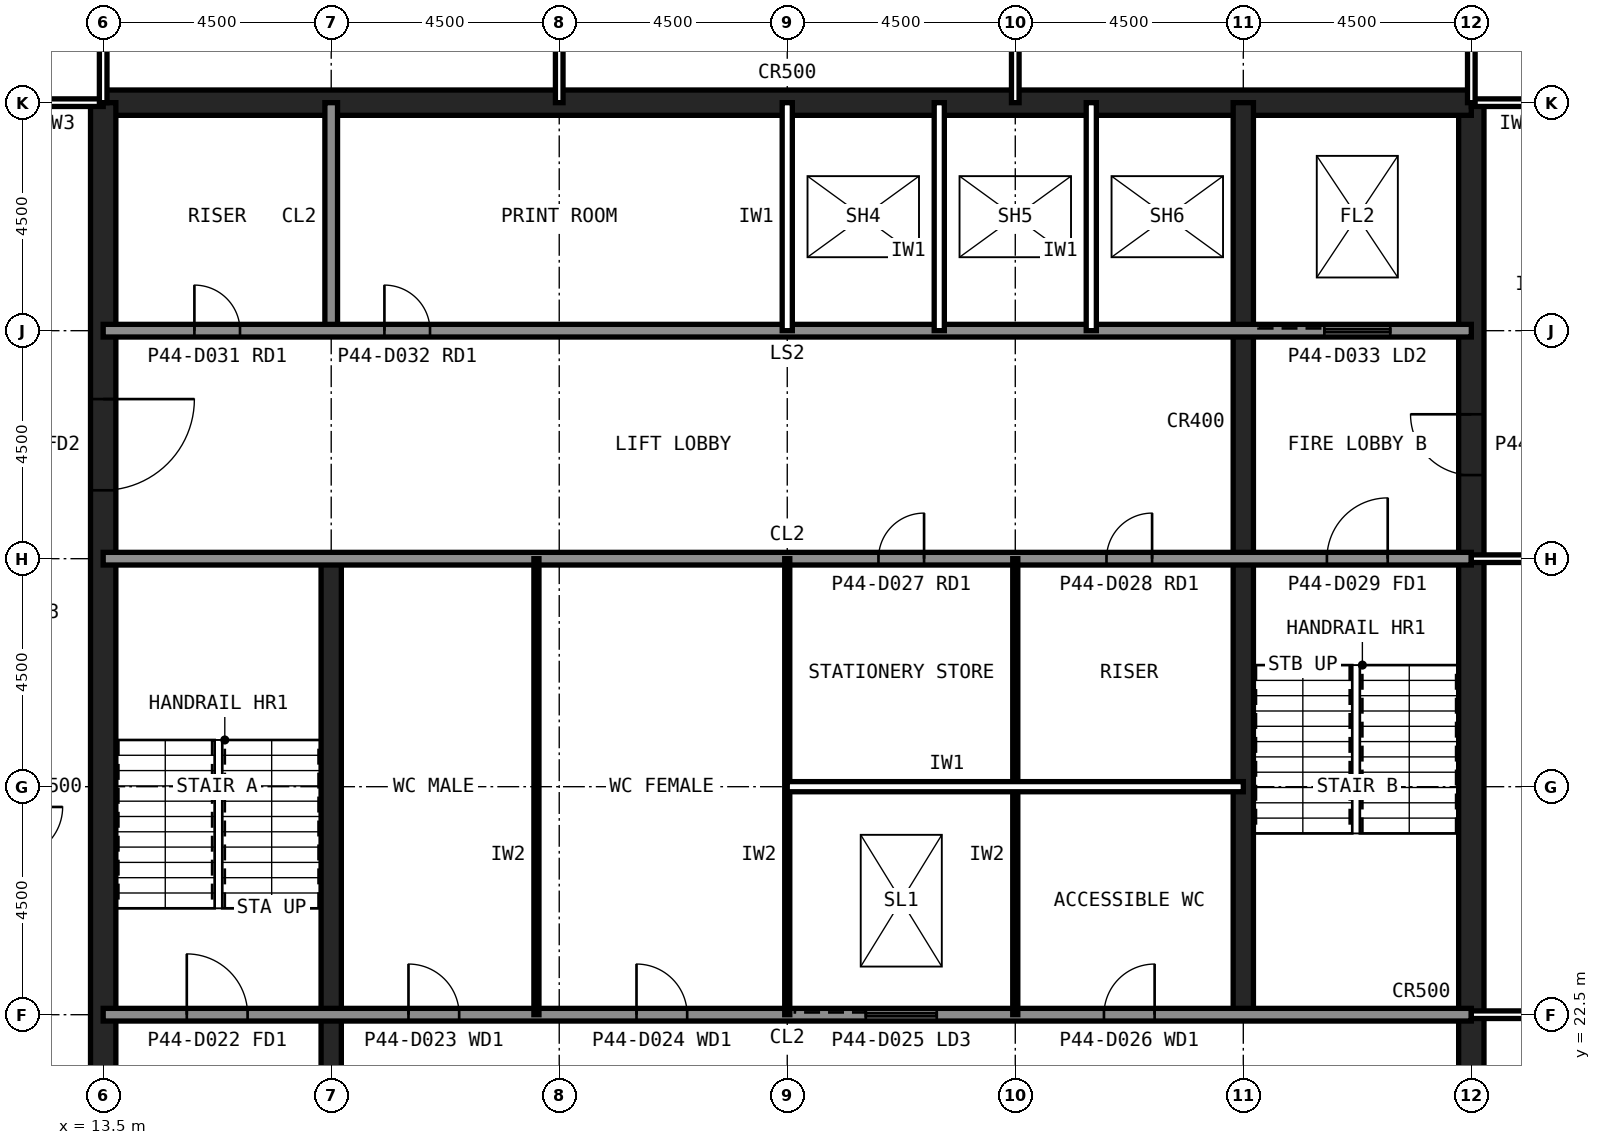
"""IFC4 building model, lengths in metres.
Left out: names, types, materials, properties, quantities, classifications, styles, units other than length and angle.
Written with IfcOpenShell. Run it as: python <this file> out.ifc"""

import sys

from ifc_helpers import new_model, si_unit, direction, frame, frame_2d, origin, place, context, subcontext, project, spatial, rectangle, extrude, element, fill, save


model = new_model("IFC4")
c1 = context("Model", 3, precision=1e-05, world=origin(), true_north=direction((0.0, 1.0)))
c2 = subcontext(c1, "Body", "Model", "MODEL_VIEW")
j1 = project(units=[si_unit("LENGTHUNIT", "METRE"), si_unit("PLANEANGLEUNIT", "RADIAN")], contexts=[c1])
p1 = place(None, origin())
s1 = spatial("IfcSite", under=j1, at=p1, CompositionType="ELEMENT")
p2 = place(p1, origin())
s2 = spatial("IfcBuilding", under=s1, at=p2, CompositionType="ELEMENT")
p3 = place(p2, frame((0.0, 0.0, 183.6)))
s3 = spatial("IfcBuildingStorey", under=s2, at=p3, CompositionType="ELEMENT", Elevation=183.6)
p4 = place(p3, frame((40.5, 13.5, 0.0), z_axis=(0.0, 0.0, 1.0), x_axis=(0.0, 1.0, 0.0)))
e1 = element("IfcWall", 1, at=p4, inside=s3, PredefinedType="SHEAR", context=c2, shape_type="SweptSolid", body=[
    extrude(rectangle(XDim=27.0, YDim=0.5, at=frame_2d((13.5, 0.0))), origin(), (0.0, 0.0, 1.0), 4.0),
])
p5 = place(p4, frame((5.85, 0.0, 0.0)))
e2 = element("IfcOpeningElement", 2, at=p5, cuts=e1, PredefinedType="OPENING", context=c2, shape_type="SweptSolid", body=[
    extrude(rectangle(XDim=1.8, YDim=2.1, at=frame_2d((0.9, 1.05))), frame((0.0, 0.26, 0.0), z_axis=(0.0, -1.0, 0.0), x_axis=(1.0, 0.0, 0.0)), (0.0, 0.0, 1.0), 0.52),
])
p6 = place(p4, frame((19.65, 0.0, 0.0)))
e3 = element("IfcOpeningElement", 3, at=p6, cuts=e1, PredefinedType="OPENING", context=c2, shape_type="SweptSolid", body=[
    extrude(rectangle(XDim=1.2, YDim=2.1, at=frame_2d((0.6, 1.05))), frame((0.0, 0.26, 0.0), z_axis=(0.0, -1.0, 0.0), x_axis=(1.0, 0.0, 0.0)), (0.0, 0.0, 1.0), 0.52),
])
p7 = place(p3, frame((40.5, 40.5, 0.0), z_axis=(0.0, 0.0, 1.0), x_axis=(-1.0, 0.0, 0.0)))
e4 = element("IfcWall", 4, at=p7, inside=s3, PredefinedType="SHEAR", context=c2, shape_type="SweptSolid", body=[
    extrude(rectangle(XDim=27.0, YDim=0.5, at=frame_2d((13.5, 0.0))), origin(), (0.0, 0.0, 1.0), 4.0),
])
p8 = place(p3, frame((13.5, 40.5, 0.0), z_axis=(0.0, 0.0, 1.0), x_axis=(0.0, -1.0, 0.0)))
e5 = element("IfcWall", 5, at=p8, inside=s3, PredefinedType="SHEAR", context=c2, shape_type="SweptSolid", body=[
    extrude(rectangle(XDim=27.0, YDim=0.5, at=frame_2d((13.5, 0.0))), origin(), (0.0, 0.0, 1.0), 4.0),
])
p9 = place(p8, frame((19.65, 0.0, 0.0)))
e6 = element("IfcOpeningElement", 6, at=p9, cuts=e5, PredefinedType="OPENING", context=c2, shape_type="SweptSolid", body=[
    extrude(rectangle(XDim=1.2, YDim=2.1, at=frame_2d((0.6, 1.05))), frame((0.0, 0.26, 0.0), z_axis=(0.0, -1.0, 0.0), x_axis=(1.0, 0.0, 0.0)), (0.0, 0.0, 1.0), 0.52),
])
p10 = place(p8, frame((5.85, 0.0, 0.0)))
e7 = element("IfcOpeningElement", 7, at=p10, cuts=e5, PredefinedType="OPENING", context=c2, shape_type="SweptSolid", body=[
    extrude(rectangle(XDim=1.8, YDim=2.1, at=frame_2d((0.9, 1.05))), frame((0.0, 0.26, 0.0), z_axis=(0.0, -1.0, 0.0), x_axis=(1.0, 0.0, 0.0)), (0.0, 0.0, 1.0), 0.52),
])
p11 = place(p3, frame((18.0, 13.5, 0.0), z_axis=(0.0, 0.0, 1.0), x_axis=(0.0, 1.0, 0.0)))
e8 = element("IfcWall", 8, at=p11, inside=s3, PredefinedType="SHEAR", context=c2, shape_type="SweptSolid", body=[
    extrude(rectangle(XDim=18.0, YDim=0.4, at=frame_2d((9.0, 0.0))), origin(), (0.0, 0.0, 1.0), 4.0),
])
p12 = place(p3, frame((18.0, 36.0, 0.0), z_axis=(0.0, 0.0, 1.0), x_axis=(0.0, 1.0, 0.0)))
e9 = element("IfcWall", 9, at=p12, inside=s3, PredefinedType="SOLIDWALL", context=c2, shape_type="SweptSolid", body=[
    extrude(rectangle(XDim=4.5, YDim=0.25, at=frame_2d((2.25, 0.0))), origin(), (0.0, 0.0, 1.0), 3.84),
])
p13 = place(p3, frame((36.0, 22.5, 0.0), z_axis=(0.0, 0.0, 1.0), x_axis=(0.0, 1.0, 0.0)))
e10 = element("IfcWall", 10, at=p13, inside=s3, PredefinedType="SHEAR", context=c2, shape_type="SweptSolid", body=[
    extrude(rectangle(XDim=18.0, YDim=0.4, at=frame_2d((9.0, 0.0))), origin(), (0.0, 0.0, 1.0), 4.0),
])
p14 = place(p3, frame((13.5, 36.0, 0.0), z_axis=(0.0, 0.0, 1.0), x_axis=(1.0, 0.0, 0.0)))
e11 = element("IfcWall", 11, at=p14, inside=s3, PredefinedType="SOLIDWALL", context=c2, shape_type="SweptSolid", body=[
    extrude(rectangle(XDim=27.0, YDim=0.25, at=frame_2d((13.5, 0.0))), origin(), (0.0, 0.0, 1.0), 3.84),
])
p15 = place(p14, frame((1.8, 0.0, 0.0)))
e12 = element("IfcOpeningElement", 12, at=p15, cuts=e11, PredefinedType="OPENING", context=c2, shape_type="SweptSolid", body=[
    extrude(rectangle(XDim=0.9, YDim=2.1, at=frame_2d((0.45, 1.05))), frame((0.0, 0.135, 0.0), z_axis=(0.0, -1.0, 0.0), x_axis=(1.0, 0.0, 0.0)), (0.0, 0.0, 1.0), 0.27),
])
p16 = place(p14, frame((5.55, 0.0, 0.0)))
e13 = element("IfcOpeningElement", 13, at=p16, cuts=e11, PredefinedType="OPENING", context=c2, shape_type="SweptSolid", body=[
    extrude(rectangle(XDim=0.9, YDim=2.1, at=frame_2d((0.45, 1.05))), frame((0.0, 0.135, 0.0), z_axis=(0.0, -1.0, 0.0), x_axis=(1.0, 0.0, 0.0)), (0.0, 0.0, 1.0), 0.27),
])
p17 = place(p14, frame((8.55, 0.0, 0.0)))
e14 = element("IfcOpeningElement", 14, at=p17, cuts=e11, PredefinedType="OPENING", context=c2, shape_type="SweptSolid", body=[
    extrude(rectangle(XDim=0.9, YDim=2.1, at=frame_2d((0.45, 1.05))), frame((0.0, 0.135, 0.0), z_axis=(0.0, -1.0, 0.0), x_axis=(1.0, 0.0, 0.0)), (0.0, 0.0, 1.0), 0.27),
])
p18 = place(p14, frame((24.1, 0.0, 0.0)))
e15 = element("IfcOpeningElement", 15, at=p18, cuts=e11, PredefinedType="OPENING", context=c2, shape_type="SweptSolid", body=[
    extrude(rectangle(XDim=1.3, YDim=2.2, at=frame_2d((0.65, 1.1))), frame((0.0, 0.135, 0.0), z_axis=(0.0, -1.0, 0.0), x_axis=(1.0, 0.0, 0.0)), (0.0, 0.0, 1.0), 0.27),
])
p19 = place(p3, frame((13.5, 22.5, 0.0), z_axis=(0.0, 0.0, 1.0), x_axis=(1.0, 0.0, 0.0)))
e16 = element("IfcWall", 16, at=p19, inside=s3, PredefinedType="SOLIDWALL", context=c2, shape_type="SweptSolid", body=[
    extrude(rectangle(XDim=27.0, YDim=0.25, at=frame_2d((13.5, 0.0))), origin(), (0.0, 0.0, 1.0), 3.84),
])
p20 = place(p19, frame((1.65, 0.0, 0.0)))
e17 = element("IfcOpeningElement", 17, at=p20, cuts=e16, PredefinedType="OPENING", context=c2, shape_type="SweptSolid", body=[
    extrude(rectangle(XDim=1.2, YDim=2.1, at=frame_2d((0.6, 1.05))), frame((0.0, 0.135, 0.0), z_axis=(0.0, -1.0, 0.0), x_axis=(1.0, 0.0, 0.0)), (0.0, 0.0, 1.0), 0.27),
])
p21 = place(p19, frame((6.025, 0.0, 0.0)))
e18 = element("IfcOpeningElement", 18, at=p21, cuts=e16, PredefinedType="OPENING", context=c2, shape_type="SweptSolid", body=[
    extrude(rectangle(XDim=1.0, YDim=2.1, at=frame_2d((0.5, 1.05))), frame((0.0, 0.135, 0.0), z_axis=(0.0, -1.0, 0.0), x_axis=(1.0, 0.0, 0.0)), (0.0, 0.0, 1.0), 0.27),
])
p22 = place(p19, frame((10.525, 0.0, 0.0)))
e19 = element("IfcOpeningElement", 19, at=p22, cuts=e16, PredefinedType="OPENING", context=c2, shape_type="SweptSolid", body=[
    extrude(rectangle(XDim=1.0, YDim=2.1, at=frame_2d((0.5, 1.05))), frame((0.0, 0.135, 0.0), z_axis=(0.0, -1.0, 0.0), x_axis=(1.0, 0.0, 0.0)), (0.0, 0.0, 1.0), 0.27),
])
p23 = place(p19, frame((19.75, 0.0, 0.0)))
e20 = element("IfcOpeningElement", 20, at=p23, cuts=e16, PredefinedType="OPENING", context=c2, shape_type="SweptSolid", body=[
    extrude(rectangle(XDim=1.0, YDim=2.1, at=frame_2d((0.5, 1.05))), frame((0.0, 0.135, 0.0), z_axis=(0.0, -1.0, 0.0), x_axis=(1.0, 0.0, 0.0)), (0.0, 0.0, 1.0), 0.27),
])
p24 = place(p19, frame((15.05, 0.0, 0.0)))
e21 = element("IfcOpeningElement", 21, at=p24, cuts=e16, PredefinedType="OPENING", context=c2, shape_type="SweptSolid", body=[
    extrude(rectangle(XDim=1.4, YDim=2.4, at=frame_2d((0.7, 1.2))), frame((0.0, 0.135, 0.0), z_axis=(0.0, -1.0, 0.0), x_axis=(1.0, 0.0, 0.0)), (0.0, 0.0, 1.0), 0.27),
])
p25 = place(p3, frame((13.5, 31.5, 0.0), z_axis=(0.0, 0.0, 1.0), x_axis=(1.0, 0.0, 0.0)))
e22 = element("IfcWall", 22, at=p25, inside=s3, PredefinedType="SOLIDWALL", context=c2, shape_type="SweptSolid", body=[
    extrude(rectangle(XDim=27.0, YDim=0.25, at=frame_2d((13.5, 0.0))), origin(), (0.0, 0.0, 1.0), 3.84),
])
p26 = place(p25, frame((24.15, 0.0, 0.0)))
e23 = element("IfcOpeningElement", 23, at=p26, cuts=e22, PredefinedType="OPENING", context=c2, shape_type="SweptSolid", body=[
    extrude(rectangle(XDim=1.2, YDim=2.1, at=frame_2d((0.6, 1.05))), frame((0.0, 0.135, 0.0), z_axis=(0.0, -1.0, 0.0), x_axis=(1.0, 0.0, 0.0)), (0.0, 0.0, 1.0), 0.27),
])
p27 = place(p25, frame((15.3, 0.0, 0.0)))
e24 = element("IfcOpeningElement", 24, at=p27, cuts=e22, PredefinedType="OPENING", context=c2, shape_type="SweptSolid", body=[
    extrude(rectangle(XDim=0.9, YDim=2.1, at=frame_2d((0.45, 1.05))), frame((0.0, 0.135, 0.0), z_axis=(0.0, -1.0, 0.0), x_axis=(1.0, 0.0, 0.0)), (0.0, 0.0, 1.0), 0.27),
])
p28 = place(p25, frame((19.8, 0.0, 0.0)))
e25 = element("IfcOpeningElement", 25, at=p28, cuts=e22, PredefinedType="OPENING", context=c2, shape_type="SweptSolid", body=[
    extrude(rectangle(XDim=0.9, YDim=2.1, at=frame_2d((0.45, 1.05))), frame((0.0, 0.135, 0.0), z_axis=(0.0, -1.0, 0.0), x_axis=(1.0, 0.0, 0.0)), (0.0, 0.0, 1.0), 0.27),
])
for number, where, z_axis, x_axis in (
    (26, (21.0, 36.0, 0.0), (0.0, 0.0, 1.0), (0.0, 1.0, 0.0)),
    (27, (27.0, 36.0, 0.0), (0.0, 0.0, 1.0), (0.0, 1.0, 0.0)),
    (28, (30.0, 36.0, 0.0), (0.0, 0.0, 1.0), (0.0, 1.0, 0.0)),
    (29, (33.0, 36.0, 0.0), (0.0, 0.0, 1.0), (0.0, 1.0, 0.0)),
):
    element("IfcWall", number, at=place(p3, frame(where, z_axis=z_axis, x_axis=x_axis)), inside=s3, PredefinedType="PARTITIONING", context=c2, shape_type="SweptSolid", body=[
        extrude(rectangle(XDim=4.5, YDim=0.2, at=frame_2d((2.25, 0.0))), origin(), (0.0, 0.0, 1.0), 3.84),
    ])
for number, where, z_axis, x_axis in (
    (30, (22.05, 22.5, 0.0), (0.0, 0.0, 1.0), (0.0, 1.0, 0.0)),
    (31, (27.0, 22.5, 0.0), (0.0, 0.0, 1.0), (0.0, 1.0, 0.0)),
    (32, (31.5, 22.5, 0.0), (0.0, 0.0, 1.0), (0.0, 1.0, 0.0)),
):
    element("IfcWall", number, at=place(p3, frame(where, z_axis=z_axis, x_axis=x_axis)), inside=s3, PredefinedType="PLUMBINGWALL", context=c2, shape_type="SweptSolid", body=[
        extrude(rectangle(XDim=9.0, YDim=0.1, at=frame_2d((4.5, 0.0))), origin(), (0.0, 0.0, 1.0), 3.84),
    ])
p29 = place(p3, frame((27.0, 27.0, 0.0), z_axis=(0.0, 0.0, 1.0), x_axis=(1.0, 0.0, 0.0)))
e33 = element("IfcWall", 33, at=p29, inside=s3, PredefinedType="PARTITIONING", context=c2, shape_type="SweptSolid", body=[
    extrude(rectangle(XDim=9.0, YDim=0.2, at=frame_2d((4.5, 0.0))), origin(), (0.0, 0.0, 1.0), 3.84),
])
p30 = place(p3, frame((42.3, 40.5, 0.0), z_axis=(0.0, 0.0, 1.0), x_axis=(-1.0, 0.0, 0.0)))
e34 = element("IfcWall", 34, at=p30, inside=s3, PredefinedType="PARTITIONING", context=c2, shape_type="SweptSolid", body=[
    extrude(rectangle(XDim=1.8, YDim=0.15, at=frame_2d((0.9, 0.0))), origin(), (0.0, 0.0, 1.0), 2.989),
])
p31 = place(p3, frame((40.5, 22.5, 0.0), z_axis=(0.0, 0.0, 1.0), x_axis=(1.0, 0.0, 0.0)))
e35 = element("IfcWall", 35, at=p31, inside=s3, PredefinedType="PARTITIONING", context=c2, shape_type="SweptSolid", body=[
    extrude(rectangle(XDim=6.75, YDim=0.15, at=frame_2d((3.375, 0.0))), origin(), (0.0, 0.0, 1.0), 2.989),
])
p32 = place(p3, frame((47.25, 31.5, 0.0), z_axis=(0.0, 0.0, 1.0), x_axis=(-1.0, 0.0, 0.0)))
e36 = element("IfcWall", 36, at=p32, inside=s3, PredefinedType="PARTITIONING", context=c2, shape_type="SweptSolid", body=[
    extrude(rectangle(XDim=6.75, YDim=0.15, at=frame_2d((3.375, 0.0))), origin(), (0.0, 0.0, 1.0), 2.989),
])
p33 = place(p32, frame((2.875, 0.0, 0.0)))
e37 = element("IfcOpeningElement", 37, at=p33, cuts=e36, PredefinedType="OPENING", context=c2, shape_type="SweptSolid", body=[
    extrude(rectangle(XDim=1.0, YDim=2.1, at=frame_2d((0.5, 1.05))), frame((0.0, 0.085, 0.0), z_axis=(0.0, -1.0, 0.0), x_axis=(1.0, 0.0, 0.0)), (0.0, 0.0, 1.0), 0.17),
])
for number, where, z_axis, x_axis in (
    (38, (22.5, 40.5, 0.0), (0.0, 0.0, 1.0), (0.0, 1.0, 0.0)),
    (39, (13.5, 43.5, 0.0), (0.0, 0.0, 1.0), (0.0, -1.0, 0.0)),
    (40, (31.5, 40.5, 0.0), (0.0, 0.0, 1.0), (0.0, 1.0, 0.0)),
    (41, (40.5, 40.5, 0.0), (0.0, 0.0, 1.0), (0.0, 1.0, 0.0)),
):
    element("IfcWall", number, at=place(p3, frame(where, z_axis=z_axis, x_axis=x_axis)), inside=s3, PredefinedType="PARTITIONING", context=c2, shape_type="SweptSolid", body=[
        extrude(rectangle(XDim=3.0, YDim=0.15, at=frame_2d((1.5, 0.0))), origin(), (0.0, 0.0, 1.0), 2.989),
    ])
p34 = place(p10, origin())
e42 = element("IfcDoor", 42, at=p34, inside=s3, OperationType="SINGLE_SWING_LEFT", PredefinedType="DOOR", context=c2, shape_type="SweptSolid", body=[
    extrude(rectangle(XDim=1.8, YDim=2.1, at=frame_2d((0.9, 1.05))), frame((0.0, 0.025, 0.0), z_axis=(0.0, -1.0, 0.0), x_axis=(1.0, 0.0, 0.0)), (0.0, 0.0, 1.0), 0.05),
])
fill(e7, e42)
p35 = place(p6, origin())
e43 = element("IfcDoor", 43, at=p35, inside=s3, OperationType="SINGLE_SWING_RIGHT", PredefinedType="DOOR", context=c2, shape_type="SweptSolid", body=[
    extrude(rectangle(XDim=1.2, YDim=2.1, at=frame_2d((0.6, 1.05))), frame((0.0, 0.025, 0.0), z_axis=(0.0, -1.0, 0.0), x_axis=(1.0, 0.0, 0.0)), (0.0, 0.0, 1.0), 0.05),
])
fill(e3, e43)
p36 = place(p20, origin())
e44 = element("IfcDoor", 44, at=p36, inside=s3, OperationType="SINGLE_SWING_LEFT", PredefinedType="DOOR", context=c2, shape_type="SweptSolid", body=[
    extrude(rectangle(XDim=1.2, YDim=2.1, at=frame_2d((0.6, 1.05))), frame((0.0, 0.025, 0.0), z_axis=(0.0, -1.0, 0.0), x_axis=(1.0, 0.0, 0.0)), (0.0, 0.0, 1.0), 0.05),
])
fill(e17, e44)
p37 = place(p26, origin())
e45 = element("IfcDoor", 45, at=p37, inside=s3, OperationType="SINGLE_SWING_RIGHT", PredefinedType="DOOR", context=c2, shape_type="SweptSolid", body=[
    extrude(rectangle(XDim=1.2, YDim=2.1, at=frame_2d((0.6, 1.05))), frame((0.0, 0.025, 0.0), z_axis=(0.0, -1.0, 0.0), x_axis=(1.0, 0.0, 0.0)), (0.0, 0.0, 1.0), 0.05),
])
fill(e23, e45)
p38 = place(p21, origin())
e46 = element("IfcDoor", 46, at=p38, inside=s3, OperationType="SINGLE_SWING_LEFT", PredefinedType="DOOR", context=c2, shape_type="SweptSolid", body=[
    extrude(rectangle(XDim=1.0, YDim=2.1, at=frame_2d((0.5, 1.05))), frame((0.0, 0.025, 0.0), z_axis=(0.0, -1.0, 0.0), x_axis=(1.0, 0.0, 0.0)), (0.0, 0.0, 1.0), 0.05),
])
fill(e18, e46)
p39 = place(p22, origin())
e47 = element("IfcDoor", 47, at=p39, inside=s3, OperationType="SINGLE_SWING_LEFT", PredefinedType="DOOR", context=c2, shape_type="SweptSolid", body=[
    extrude(rectangle(XDim=1.0, YDim=2.1, at=frame_2d((0.5, 1.05))), frame((0.0, 0.025, 0.0), z_axis=(0.0, -1.0, 0.0), x_axis=(1.0, 0.0, 0.0)), (0.0, 0.0, 1.0), 0.05),
])
fill(e19, e47)
p40 = place(p23, origin())
e48 = element("IfcDoor", 48, at=p40, inside=s3, OperationType="SINGLE_SWING_RIGHT", PredefinedType="DOOR", context=c2, shape_type="SweptSolid", body=[
    extrude(rectangle(XDim=1.0, YDim=2.1, at=frame_2d((0.5, 1.05))), frame((0.0, 0.025, 0.0), z_axis=(0.0, -1.0, 0.0), x_axis=(1.0, 0.0, 0.0)), (0.0, 0.0, 1.0), 0.05),
])
fill(e20, e48)
p41 = place(p27, origin())
e49 = element("IfcDoor", 49, at=p41, inside=s3, OperationType="SINGLE_SWING_RIGHT", PredefinedType="DOOR", context=c2, shape_type="SweptSolid", body=[
    extrude(rectangle(XDim=0.9, YDim=2.1, at=frame_2d((0.45, 1.05))), frame((0.0, 0.025, 0.0), z_axis=(0.0, -1.0, 0.0), x_axis=(1.0, 0.0, 0.0)), (0.0, 0.0, 1.0), 0.05),
])
fill(e24, e49)
p42 = place(p28, origin())
e50 = element("IfcDoor", 50, at=p42, inside=s3, OperationType="SINGLE_SWING_RIGHT", PredefinedType="DOOR", context=c2, shape_type="SweptSolid", body=[
    extrude(rectangle(XDim=0.9, YDim=2.1, at=frame_2d((0.45, 1.05))), frame((0.0, 0.025, 0.0), z_axis=(0.0, -1.0, 0.0), x_axis=(1.0, 0.0, 0.0)), (0.0, 0.0, 1.0), 0.05),
])
fill(e25, e50)
p43 = place(p15, origin())
e51 = element("IfcDoor", 51, at=p43, inside=s3, OperationType="SINGLE_SWING_LEFT", PredefinedType="DOOR", context=c2, shape_type="SweptSolid", body=[
    extrude(rectangle(XDim=0.9, YDim=2.1, at=frame_2d((0.45, 1.05))), frame((0.0, 0.025, 0.0), z_axis=(0.0, -1.0, 0.0), x_axis=(1.0, 0.0, 0.0)), (0.0, 0.0, 1.0), 0.05),
])
fill(e12, e51)
p44 = place(p16, origin())
e52 = element("IfcDoor", 52, at=p44, inside=s3, OperationType="SINGLE_SWING_LEFT", PredefinedType="DOOR", context=c2, shape_type="SweptSolid", body=[
    extrude(rectangle(XDim=0.9, YDim=2.1, at=frame_2d((0.45, 1.05))), frame((0.0, 0.025, 0.0), z_axis=(0.0, -1.0, 0.0), x_axis=(1.0, 0.0, 0.0)), (0.0, 0.0, 1.0), 0.05),
])
fill(e13, e52)
p45 = place(p17, origin())
e53 = element("IfcDoor", 53, at=p45, inside=s3, OperationType="SINGLE_SWING_LEFT", PredefinedType="DOOR", context=c2, shape_type="SweptSolid", body=[
    extrude(rectangle(XDim=0.9, YDim=2.1, at=frame_2d((0.45, 1.05))), frame((0.0, 0.025, 0.0), z_axis=(0.0, -1.0, 0.0), x_axis=(1.0, 0.0, 0.0)), (0.0, 0.0, 1.0), 0.05),
])
fill(e14, e53)
p46 = place(p18, origin())
e54 = element("IfcDoor", 54, at=p46, inside=s3, OperationType="SLIDING_TO_LEFT", PredefinedType="DOOR", context=c2, shape_type="SweptSolid", body=[
    extrude(rectangle(XDim=1.3, YDim=2.2, at=frame_2d((0.65, 1.1))), frame((0.0, 0.025, 0.0), z_axis=(0.0, -1.0, 0.0), x_axis=(1.0, 0.0, 0.0)), (0.0, 0.0, 1.0), 0.05),
])
fill(e15, e54)
p47 = place(p24, origin())
e55 = element("IfcDoor", 55, at=p47, inside=s3, OperationType="SLIDING_TO_LEFT", PredefinedType="DOOR", context=c2, shape_type="SweptSolid", body=[
    extrude(rectangle(XDim=1.4, YDim=2.4, at=frame_2d((0.7, 1.2))), frame((0.0, 0.025, 0.0), z_axis=(0.0, -1.0, 0.0), x_axis=(1.0, 0.0, 0.0)), (0.0, 0.0, 1.0), 0.05),
])
fill(e21, e55)
save(model, sys.argv[1])
